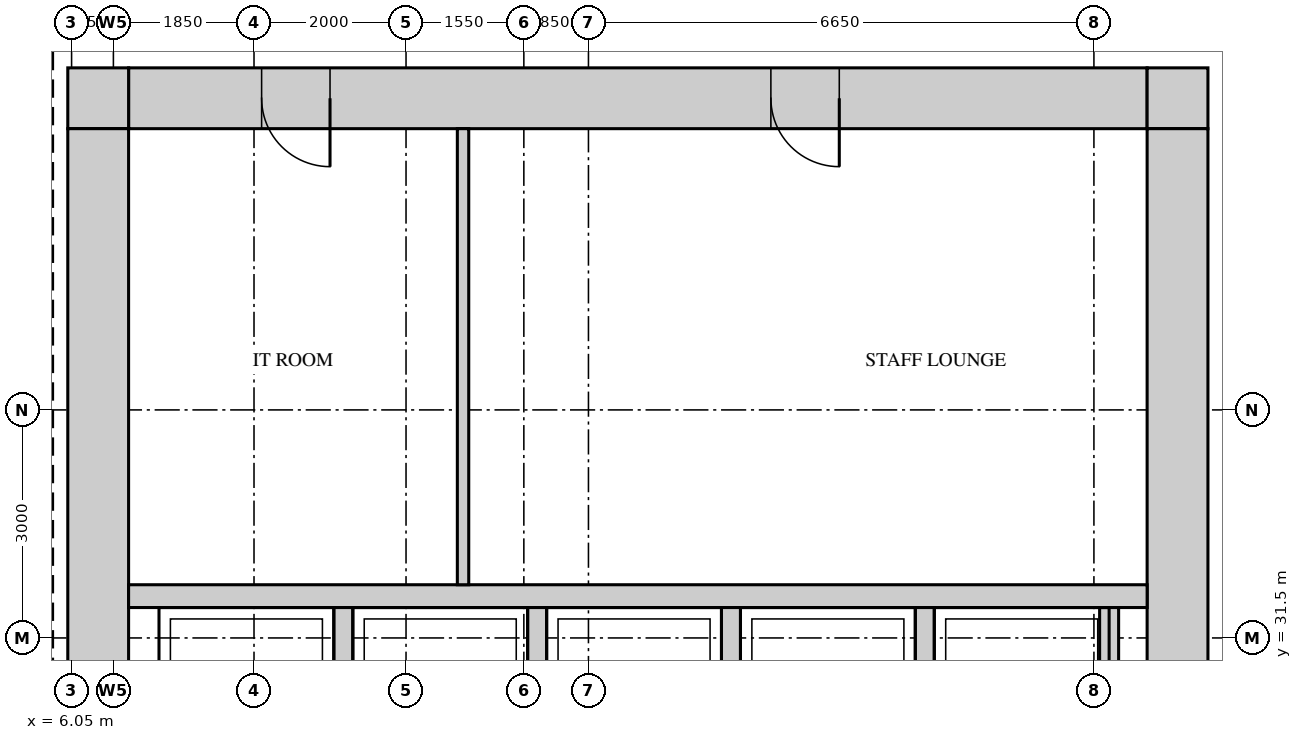
"""IFC4 building model, lengths in metres.
Left out: names, types, materials, properties, quantities, classifications, styles, units other than length and angle.
Written with IfcOpenShell. Run it as: python <this file> out.ifc"""

import sys

from ifc_helpers import new_model, si_unit, direction, frame, frame_2d, origin, place, context, subcontext, project, spatial, rectangle, extrude, source, transform, mapped, element, fill, save


model = new_model("IFC4")
c1 = context("Model", 3, precision=1e-05, world=origin(), true_north=direction((0.0, 1.0)))
c2 = subcontext(c1, "Body", "Model", "MODEL_VIEW")
j1 = project(units=[si_unit("LENGTHUNIT", "METRE"), si_unit("PLANEANGLEUNIT", "RADIAN")], contexts=[c1])
p1 = place(None, origin())
s1 = spatial("IfcSite", under=j1, at=p1, CompositionType="ELEMENT")
p2 = place(p1, origin())
s2 = spatial("IfcBuilding", under=s1, at=p2, CompositionType="ELEMENT")
p3 = place(p2, frame((0.0, 0.0, 188.7)))
s3 = spatial("IfcBuildingStorey", under=s2, at=p3, CompositionType="ELEMENT", Elevation=188.7)
m1 = source(origin(), c2, "Body", "SweptSolid", [
    extrude(rectangle(XDim=13.4, YDim=0.8, at=frame_2d((6.7, 0.0))), origin(), (0.0, 0.0, 1.0), 3.75),
])
p4 = place(p3, frame((6.8, 38.6, 0.0), z_axis=(0.0, 0.0, 1.0), x_axis=(1.0, 0.0, 0.0)))
e1 = element("IfcWall", 1, at=p4, inside=s3, PredefinedType="SHEAR", context=c2, shape_type="MappedRepresentation", body=[
    mapped(m1, transform((0.0, 0.0, 0.0))),
])
m2 = source(origin(), c2, "Body", "SweptSolid", [
    extrude(rectangle(XDim=0.9, YDim=2.1, at=frame_2d((0.45, 1.05))), frame((0.0, 0.41, 0.0), z_axis=(0.0, -1.0, 0.0), x_axis=(1.0, 0.0, 0.0)), (0.0, 0.0, 1.0), 0.82),
])
p5 = place(p4, frame((1.75, 0.0, 0.0)))
e2 = element("IfcOpeningElement", 2, at=p5, cuts=e1, PredefinedType="OPENING", context=c2, shape_type="MappedRepresentation", body=[
    mapped(m2, transform((0.0, 0.0, 0.0))),
])
p6 = place(p4, frame((8.45, 0.0, 0.0)))
e3 = element("IfcOpeningElement", 3, at=p6, cuts=e1, PredefinedType="OPENING", context=c2, shape_type="MappedRepresentation", body=[
    mapped(m2, transform((0.0, 0.0, 0.0))),
])
m3 = source(origin(), c2, "Body", "SweptSolid", [
    extrude(rectangle(XDim=0.8, YDim=0.8, at=frame_2d((0.4, 0.0))), origin(), (0.0, 0.0, 1.0), 3.75),
])
for number, where, z_axis, x_axis in (
    (4, (20.2, 38.6, 0.0), (0.0, 0.0, 1.0), (1.0, 0.0, 0.0)),
    (5, (6.0, 38.6, 0.0), (0.0, 0.0, 1.0), (1.0, 0.0, 0.0)),
):
    element("IfcWall", number, at=place(p3, frame(where, z_axis=z_axis, x_axis=x_axis)), inside=s3, PredefinedType="SHEAR", context=c2, shape_type="MappedRepresentation", body=[
        mapped(m3, transform((0.0, 0.0, 0.0))),
    ])
m4 = source(origin(), c2, "Body", "SweptSolid", [
    extrude(rectangle(XDim=22.4, YDim=0.8, at=frame_2d((11.2, 0.0))), origin(), (0.0, 0.0, 1.0), 3.75),
])
p7 = place(p3, frame((20.6, 15.8, 0.0), z_axis=(0.0, 0.0, 1.0), x_axis=(0.0, 1.0, 0.0)))
e6 = element("IfcWall", 6, at=p7, inside=s3, PredefinedType="SHEAR", context=c2, shape_type="MappedRepresentation", body=[
    mapped(m4, transform((0.0, 0.0, 0.0))),
])
m5 = source(origin(), c2, "Body", "SweptSolid", [
    extrude(rectangle(XDim=1.8, YDim=2.1, at=frame_2d((0.9, 1.05))), frame((0.0, 0.41, 0.0), z_axis=(0.0, -1.0, 0.0), x_axis=(1.0, 0.0, 0.0)), (0.0, 0.0, 1.0), 0.82),
])
p8 = place(p7, frame((10.7, 0.0, 0.0)))
e7 = element("IfcOpeningElement", 7, at=p8, cuts=e6, PredefinedType="OPENING", context=c2, shape_type="MappedRepresentation", body=[
    mapped(m5, transform((0.0, 0.0, 0.0))),
])
p9 = place(p7, frame((0.35, 0.0, 0.0)))
e8 = element("IfcOpeningElement", 8, at=p9, cuts=e6, PredefinedType="OPENING", context=c2, shape_type="MappedRepresentation", body=[
    mapped(m2, transform((0.0, 0.0, 0.0))),
])
p10 = place(p7, frame((2.15, 0.0, 0.0)))
e9 = element("IfcOpeningElement", 9, at=p10, cuts=e6, PredefinedType="OPENING", context=c2, shape_type="MappedRepresentation", body=[
    mapped(m2, transform((0.0, 0.0, 0.0))),
])
m6 = source(origin(), c2, "Body", "SweptSolid", [
    extrude(rectangle(XDim=1.0, YDim=2.1, at=frame_2d((0.5, 1.05))), frame((0.0, 0.41, 0.0), z_axis=(0.0, -1.0, 0.0), x_axis=(1.0, 0.0, 0.0)), (0.0, 0.0, 1.0), 0.82),
])
p11 = place(p7, frame((4.85, 0.0, 0.0)))
e10 = element("IfcOpeningElement", 10, at=p11, cuts=e6, PredefinedType="OPENING", context=c2, shape_type="MappedRepresentation", body=[
    mapped(m6, transform((0.0, 0.0, 0.0))),
])
p12 = place(p3, frame((6.4, 15.8, 0.0), z_axis=(0.0, 0.0, 1.0), x_axis=(0.0, 1.0, 0.0)))
e11 = element("IfcWall", 11, at=p12, inside=s3, PredefinedType="SHEAR", context=c2, shape_type="MappedRepresentation", body=[
    mapped(m4, transform((0.0, 0.0, 0.0))),
])
m7 = source(origin(), c2, "Body", "SweptSolid", [
    extrude(rectangle(XDim=13.4, YDim=0.3, at=frame_2d((6.7, 0.0))), origin(), (0.0, 0.0, 1.0), 3.75),
])
p13 = place(p3, frame((6.8, 32.05, 0.0), z_axis=(0.0, 0.0, 1.0), x_axis=(1.0, 0.0, 0.0)))
e12 = element("IfcWall", 12, at=p13, inside=s3, PredefinedType="STANDARD", context=c2, shape_type="MappedRepresentation", body=[
    mapped(m7, transform((0.0, 0.0, 0.0))),
])
m8 = source(origin(), c2, "Body", "SweptSolid", [
    extrude(rectangle(XDim=2.4, YDim=0.25, at=frame_2d((1.2, 0.0))), origin(), (0.0, 0.0, 1.0), 3.75),
])
for number, where, z_axis, x_axis in (
    (13, (17.275, 29.5, 0.0), (0.0, 0.0, 1.0), (0.0, 1.0, 0.0)),
    (14, (19.7, 29.5, 0.0), (0.0, 0.0, 1.0), (0.0, 1.0, 0.0)),
    (15, (9.625, 29.5, 0.0), (0.0, 0.0, 1.0), (0.0, 1.0, 0.0)),
    (16, (12.175, 29.5, 0.0), (0.0, 0.0, 1.0), (0.0, 1.0, 0.0)),
    (17, (14.725, 29.5, 0.0), (0.0, 0.0, 1.0), (0.0, 1.0, 0.0)),
):
    element("IfcWall", number, at=place(p3, frame(where, z_axis=z_axis, x_axis=x_axis)), inside=s3, PredefinedType="STANDARD", context=c2, shape_type="MappedRepresentation", body=[
        mapped(m8, transform((0.0, 0.0, 0.0))),
    ])
m9 = source(origin(), c2, "Body", "SweptSolid", [
    extrude(rectangle(XDim=6.0, YDim=0.15, at=frame_2d((3.0, 0.0))), origin(), (0.0, 0.0, 1.0), 3.8),
])
p14 = place(p3, frame((11.2, 32.2, 0.0), z_axis=(0.0, 0.0, 1.0), x_axis=(0.0, 1.0, 0.0)))
e18 = element("IfcWall", 18, at=p14, inside=s3, PredefinedType="PARTITIONING", context=c2, shape_type="MappedRepresentation", body=[
    mapped(m9, transform((0.0, 0.0, 0.0))),
])
m10 = source(origin(), c2, "Body", "SweptSolid", [
    extrude(rectangle(XDim=0.9, YDim=2.1, at=frame_2d((0.45, 1.05))), frame((0.0, 0.35, 0.0), z_axis=(0.0, -1.0, 0.0), x_axis=(1.0, 0.0, 0.0)), (0.0, 0.0, 1.0), 0.7),
])
p15 = place(p5, origin())
e19 = element("IfcDoor", 19, at=p15, inside=s3, OperationType="SINGLE_SWING_RIGHT", PredefinedType="DOOR", context=c2, shape_type="MappedRepresentation", body=[
    mapped(m10, transform((0.0, 0.0, 0.0))),
])
fill(e2, e19)
p16 = place(p6, origin())
e20 = element("IfcDoor", 20, at=p16, inside=s3, OperationType="SINGLE_SWING_RIGHT", PredefinedType="DOOR", context=c2, shape_type="MappedRepresentation", body=[
    mapped(m10, transform((0.0, 0.0, 0.0))),
])
fill(e3, e20)
save(model, sys.argv[1])
